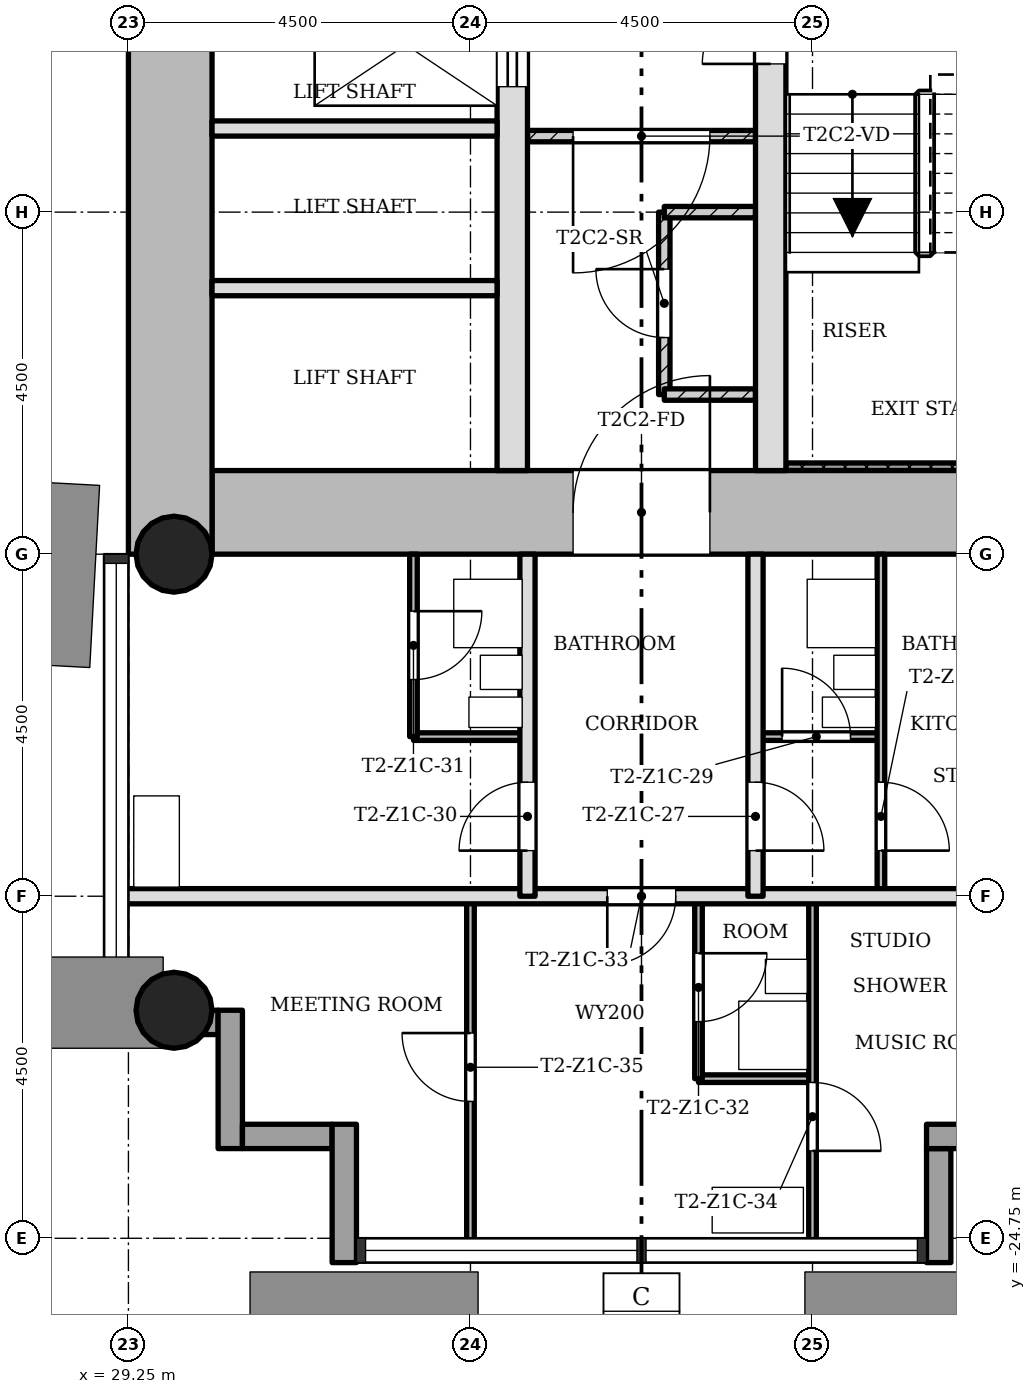
"""IFC4 building model, lengths in metres.
Left out: names, types, materials, properties, quantities, classifications, styles, units other than length and angle.
Written with IfcOpenShell. Run it as: python <this file> out.ifc"""

import sys

from ifc_helpers import new_model, si_unit, direction, frame, frame_2d, origin, origin_2d, place, context, subcontext, project, spatial, rectangle, hollow_circle, extrude, element, fill, save


model = new_model("IFC4")
c1 = context("Model", 3, precision=1e-05, world=origin(), true_north=direction((0.0, 1.0)))
c2 = subcontext(c1, "Body", "Model", "MODEL_VIEW")
j1 = project(units=[si_unit("LENGTHUNIT", "METRE"), si_unit("PLANEANGLEUNIT", "RADIAN")], contexts=[c1])
p1 = place(None, origin())
s1 = spatial("IfcSite", under=j1, at=p1, CompositionType="ELEMENT")
p2 = place(p1, origin())
s2 = spatial("IfcBuilding", under=s1, at=p2, CompositionType="ELEMENT")
p3 = place(p2, frame((0.0, 0.0, 44.9)))
s3 = spatial("IfcBuildingStorey", under=s2, at=p3, CompositionType="ELEMENT", Elevation=44.9)
p4 = place(p3, frame((30.35, -15.2, 0.0), z_axis=(0.0, 0.0, 1.0), x_axis=(1.0, 0.0, 0.0)))
e1 = element("IfcWall", 1, at=p4, inside=s3, PredefinedType="SHEAR", context=c2, shape_type="SweptSolid", body=[
    extrude(rectangle(XDim=12.4, YDim=1.1, at=frame_2d((6.2, 0.0))), origin(), (0.0, 0.0, 1.0), 3.4),
])
p5 = place(p4, frame((4.75, 0.0, 0.0)))
e2 = element("IfcOpeningElement", 2, at=p5, cuts=e1, PredefinedType="OPENING", context=c2, shape_type="SweptSolid", body=[
    extrude(rectangle(XDim=1.8, YDim=2.1, at=frame_2d((0.9, 1.05))), frame((0.0, 0.56, 0.0), z_axis=(0.0, -1.0, 0.0), x_axis=(1.0, 0.0, 0.0)), (0.0, 0.0, 1.0), 1.12),
])
p6 = place(p3, frame((29.8, -7.85, 0.0), z_axis=(0.0, 0.0, 1.0), x_axis=(0.0, -1.0, 0.0)))
e3 = element("IfcWall", 3, at=p6, inside=s3, PredefinedType="SHEAR", context=c2, shape_type="SweptSolid", body=[
    extrude(rectangle(XDim=7.9, YDim=1.1, at=frame_2d((3.95, 0.0))), origin(), (0.0, 0.0, 1.0), 3.4),
])
p7 = place(p3, frame((34.3, -14.65, 0.0), z_axis=(0.0, 0.0, 1.0), x_axis=(0.0, 1.0, 0.0)))
e4 = element("IfcWall", 4, at=p7, inside=s3, PredefinedType="SHEAR", context=c2, shape_type="SweptSolid", body=[
    extrude(rectangle(XDim=6.8, YDim=0.4, at=frame_2d((3.4, 0.0))), origin(), (0.0, 0.0, 1.0), 3.4),
])
p8 = place(p7, frame((5.05, 0.0, 0.0)))
e5 = element("IfcOpeningElement", 5, at=p8, cuts=e4, PredefinedType="OPENING", context=c2, shape_type="SweptSolid", body=[
    extrude(rectangle(XDim=1.1, YDim=2.1, at=frame_2d((0.55, 1.05))), frame((0.0, 0.21, 0.0), z_axis=(0.0, -1.0, 0.0), x_axis=(1.0, 0.0, 0.0)), (0.0, 0.0, 1.0), 0.42),
])
p9 = place(p3, frame((37.7, -14.65, 0.0), z_axis=(0.0, 0.0, 1.0), x_axis=(0.0, 1.0, 0.0)))
e6 = element("IfcWall", 6, at=p9, inside=s3, PredefinedType="SHEAR", context=c2, shape_type="SweptSolid", body=[
    extrude(rectangle(XDim=6.8, YDim=0.4, at=frame_2d((3.4, 0.0))), origin(), (0.0, 0.0, 1.0), 3.4),
])
p10 = place(p9, frame((5.35, 0.0, 0.0)))
e7 = element("IfcOpeningElement", 7, at=p10, cuts=e6, PredefinedType="OPENING", context=c2, shape_type="SweptSolid", body=[
    extrude(rectangle(XDim=0.9, YDim=2.1, at=frame_2d((0.45, 1.05))), frame((0.0, 0.21, 0.0), z_axis=(0.0, -1.0, 0.0), x_axis=(1.0, 0.0, 0.0)), (0.0, 0.0, 1.0), 0.42),
])
for number, where, z_axis, x_axis in (
    (8, (29.85, -15.75, 0.0), (0.0, 0.0, 1.0), (1.0, 0.0, 0.0)),
    (9, (29.85, -21.75, 0.0), (0.0, 0.0, 1.0), (1.0, 0.0, 0.0)),
):
    element("IfcColumn", number, at=place(p3, frame(where, z_axis=z_axis, x_axis=x_axis)), inside=s3, PredefinedType="COLUMN", context=c2, shape_type="SweptSolid", body=[
        extrude(hollow_circle(Radius=0.5, WallThickness=0.036, at=origin_2d()), origin(), (0.0, 0.0, 1.0), 3.4),
    ])
p11 = place(p3, frame((39.91, -25.07, -0.3), z_axis=(0.0, 0.0, 1.0), x_axis=(0.0, 1.0, 0.0)))
e10 = element("IfcWall", 10, at=p11, inside=s3, PredefinedType="STANDARD", context=c2, shape_type="SweptSolid", body=[
    extrude(rectangle(XDim=1.5, YDim=0.32, at=frame_2d((0.75, 0.0))), origin(), (0.0, 0.0, 1.0), 3.4),
])
p12 = place(p3, frame((39.75, -23.41, -0.3), z_axis=(0.0, 0.0, 1.0), x_axis=(1.0, 0.0, 0.0)))
e11 = element("IfcWall", 11, at=p12, inside=s3, PredefinedType="STANDARD", context=c2, shape_type="SweptSolid", body=[
    extrude(rectangle(XDim=1.82, YDim=0.32, at=frame_2d((0.91, 0.0))), origin(), (0.0, 0.0, 1.0), 3.4),
])
p13 = place(p3, frame((28.93, -21.91, -0.3), z_axis=(0.0, 0.0, 1.0), x_axis=(1.0, 0.0, 0.0)))
e12 = element("IfcWall", 12, at=p13, inside=s3, PredefinedType="STANDARD", context=c2, shape_type="SweptSolid", body=[
    extrude(rectangle(XDim=1.5, YDim=0.32, at=frame_2d((0.75, 0.0))), origin(), (0.0, 0.0, 1.0), 3.4),
])
p14 = place(p3, frame((30.59, -21.75, -0.3), z_axis=(0.0, 0.0, 1.0), x_axis=(0.0, -1.0, 0.0)))
e13 = element("IfcWall", 13, at=p14, inside=s3, PredefinedType="STANDARD", context=c2, shape_type="SweptSolid", body=[
    extrude(rectangle(XDim=1.82, YDim=0.32, at=frame_2d((0.91, 0.0))), origin(), (0.0, 0.0, 1.0), 3.4),
])
p15 = place(p3, frame((30.75, -23.41, -0.3), z_axis=(0.0, 0.0, 1.0), x_axis=(1.0, 0.0, 0.0)))
e14 = element("IfcWall", 14, at=p15, inside=s3, PredefinedType="STANDARD", context=c2, shape_type="SweptSolid", body=[
    extrude(rectangle(XDim=1.18, YDim=0.32, at=frame_2d((0.59, 0.0))), origin(), (0.0, 0.0, 1.0), 3.4),
])
p16 = place(p3, frame((32.09, -23.25, -0.3), z_axis=(0.0, 0.0, 1.0), x_axis=(0.0, -1.0, 0.0)))
e15 = element("IfcWall", 15, at=p16, inside=s3, PredefinedType="STANDARD", context=c2, shape_type="SweptSolid", body=[
    extrude(rectangle(XDim=1.82, YDim=0.32, at=frame_2d((0.91, 0.0))), origin(), (0.0, 0.0, 1.0), 3.4),
])
p17 = place(p3, frame((34.5, -10.25, 0.0), z_axis=(0.0, 0.0, 1.0), x_axis=(1.0, 0.0, 0.0)))
e16 = element("IfcWall", 16, at=p17, inside=s3, PredefinedType="PARTITIONING", context=c2, shape_type="SweptSolid", body=[
    extrude(rectangle(XDim=3.0, YDim=0.15, at=frame_2d((1.5, 0.0))), origin(), (0.0, 0.0, 1.0), 3.0),
])
p18 = place(p17, frame((0.6, 0.0, 0.0)))
e17 = element("IfcOpeningElement", 17, at=p18, cuts=e16, PredefinedType="OPENING", context=c2, shape_type="SweptSolid", body=[
    extrude(rectangle(XDim=1.8, YDim=2.1, at=frame_2d((0.9, 1.05))), frame((0.0, 0.085, 0.0), z_axis=(0.0, -1.0, 0.0), x_axis=(1.0, 0.0, 0.0)), (0.0, 0.0, 1.0), 0.17),
])
for number, where, z_axis, x_axis in (
    (18, (30.35, -10.15, 0.0), (0.0, 0.0, 1.0), (1.0, 0.0, 0.0)),
    (19, (30.35, -12.25, 0.0), (0.0, 0.0, 1.0), (1.0, 0.0, 0.0)),
):
    element("IfcWall", number, at=place(p3, frame(where, z_axis=z_axis, x_axis=x_axis)), inside=s3, PredefinedType="SOLIDWALL", context=c2, shape_type="SweptSolid", body=[
        extrude(rectangle(XDim=3.75, YDim=0.2, at=frame_2d((1.875, 0.0))), origin(), (0.0, 0.0, 1.0), 3.0),
    ])
p19 = place(p3, frame((36.3, -11.25, 0.0), z_axis=(0.0, 0.0, 1.0), x_axis=(0.0, -1.0, 0.0)))
e20 = element("IfcWall", 20, at=p19, inside=s3, PredefinedType="PARTITIONING", context=c2, shape_type="SweptSolid", body=[
    extrude(rectangle(XDim=2.4, YDim=0.15, at=frame_2d((1.2, 0.0))), origin(), (0.0, 0.0, 1.0), 3.0),
])
p20 = place(p19, frame((0.75, 0.0, 0.0)))
e21 = element("IfcOpeningElement", 21, at=p20, cuts=e20, PredefinedType="OPENING", context=c2, shape_type="SweptSolid", body=[
    extrude(rectangle(XDim=0.9, YDim=2.1, at=frame_2d((0.45, 1.05))), frame((0.0, 0.085, 0.0), z_axis=(0.0, -1.0, 0.0), x_axis=(1.0, 0.0, 0.0)), (0.0, 0.0, 1.0), 0.17),
])
for number, where, z_axis, x_axis in (
    (22, (36.3, -11.25, 0.0), (0.0, 0.0, 1.0), (1.0, 0.0, 0.0)),
    (23, (36.3, -13.65, 0.0), (0.0, 0.0, 1.0), (1.0, 0.0, 0.0)),
):
    element("IfcWall", number, at=place(p3, frame(where, z_axis=z_axis, x_axis=x_axis)), inside=s3, PredefinedType="PARTITIONING", context=c2, shape_type="SweptSolid", body=[
        extrude(rectangle(XDim=1.2, YDim=0.15, at=frame_2d((0.6, 0.0))), origin(), (0.0, 0.0, 1.0), 3.0),
    ])
p21 = place(p3, frame((38.25, -22.65, 0.0), z_axis=(0.0, 0.0, 1.0), x_axis=(-1.0, 0.0, 0.0)))
e24 = element("IfcWall", 24, at=p21, inside=s3, PredefinedType="PARTITIONING", context=c2, shape_type="SweptSolid", body=[
    extrude(rectangle(XDim=1.5, YDim=0.1, at=frame_2d((0.75, 0.0))), origin(), (0.0, 0.0, 1.0), 3.0),
])
p22 = place(p3, frame((42.85, -20.25, 0.0), z_axis=(0.0, 0.0, 1.0), x_axis=(-1.0, 0.0, 0.0)))
e25 = element("IfcWall", 25, at=p22, inside=s3, PredefinedType="SOLIDWALL", context=c2, shape_type="SweptSolid", body=[
    extrude(rectangle(XDim=13.7, YDim=0.2, at=frame_2d((6.85, 0.0))), origin(), (0.0, 0.0, 1.0), 3.0),
])
p23 = place(p22, frame((6.4, 0.0, 0.0)))
e26 = element("IfcOpeningElement", 26, at=p23, cuts=e25, PredefinedType="OPENING", context=c2, shape_type="SweptSolid", body=[
    extrude(rectangle(XDim=0.9, YDim=2.1, at=frame_2d((0.45, 1.05))), frame((0.0, 0.11, 0.0), z_axis=(0.0, -1.0, 0.0), x_axis=(1.0, 0.0, 0.0)), (0.0, 0.0, 1.0), 0.22),
])
p24 = place(p3, frame((39.15, -18.15, 0.0), z_axis=(0.0, 0.0, 1.0), x_axis=(-1.0, 0.0, 0.0)))
e27 = element("IfcWall", 27, at=p24, inside=s3, PredefinedType="PARTITIONING", context=c2, shape_type="SweptSolid", body=[
    extrude(rectangle(XDim=1.65, YDim=0.1, at=frame_2d((0.825, 0.0))), origin(), (0.0, 0.0, 1.0), 3.0),
])
p25 = place(p24, frame((0.4, 0.0, 0.0)))
e28 = element("IfcOpeningElement", 28, at=p25, cuts=e27, PredefinedType="OPENING", context=c2, shape_type="SweptSolid", body=[
    extrude(rectangle(XDim=0.9, YDim=2.1, at=frame_2d((0.45, 1.05))), frame((0.0, 0.06, 0.0), z_axis=(0.0, -1.0, 0.0), x_axis=(1.0, 0.0, 0.0)), (0.0, 0.0, 1.0), 0.12),
])
p26 = place(p3, frame((34.5, -18.15, 0.0), z_axis=(0.0, 0.0, 1.0), x_axis=(-1.0, 0.0, 0.0)))
e29 = element("IfcWall", 29, at=p26, inside=s3, PredefinedType="PARTITIONING", context=c2, shape_type="SweptSolid", body=[
    extrude(rectangle(XDim=1.5, YDim=0.1, at=frame_2d((0.75, 0.0))), origin(), (0.0, 0.0, 1.0), 3.0),
])
p27 = place(p3, frame((39.15, -20.25, 0.0), z_axis=(0.0, 0.0, 1.0), x_axis=(0.0, 1.0, 0.0)))
e30 = element("IfcWall", 30, at=p27, inside=s3, PredefinedType="PARTITIONING", context=c2, shape_type="SweptSolid", body=[
    extrude(rectangle(XDim=4.5, YDim=0.1, at=frame_2d((2.25, 0.0))), origin(), (0.0, 0.0, 1.0), 3.0),
])
p28 = place(p27, frame((0.6, 0.0, 0.0)))
e31 = element("IfcOpeningElement", 31, at=p28, cuts=e30, PredefinedType="OPENING", context=c2, shape_type="SweptSolid", body=[
    extrude(rectangle(XDim=0.9, YDim=2.1, at=frame_2d((0.45, 1.05))), frame((0.0, 0.06, 0.0), z_axis=(0.0, -1.0, 0.0), x_axis=(1.0, 0.0, 0.0)), (0.0, 0.0, 1.0), 0.12),
])
p29 = place(p3, frame((38.25, -24.85, 0.0), z_axis=(0.0, 0.0, 1.0), x_axis=(0.0, 1.0, 0.0)))
e32 = element("IfcWall", 32, at=p29, inside=s3, PredefinedType="PARTITIONING", context=c2, shape_type="SweptSolid", body=[
    extrude(rectangle(XDim=4.6, YDim=0.1, at=frame_2d((2.3, 0.0))), origin(), (0.0, 0.0, 1.0), 3.0),
])
p30 = place(p29, frame((1.25, 0.0, 0.0)))
e33 = element("IfcOpeningElement", 33, at=p30, cuts=e32, PredefinedType="OPENING", context=c2, shape_type="SweptSolid", body=[
    extrude(rectangle(XDim=0.9, YDim=2.1, at=frame_2d((0.45, 1.05))), frame((0.0, 0.06, 0.0), z_axis=(0.0, -1.0, 0.0), x_axis=(1.0, 0.0, 0.0)), (0.0, 0.0, 1.0), 0.12),
])
p31 = place(p3, frame((37.5, -20.25, 0.0), z_axis=(0.0, 0.0, 1.0), x_axis=(0.0, 1.0, 0.0)))
e34 = element("IfcWall", 34, at=p31, inside=s3, PredefinedType="SOLIDWALL", context=c2, shape_type="SweptSolid", body=[
    extrude(rectangle(XDim=4.5, YDim=0.2, at=frame_2d((2.25, 0.0))), origin(), (0.0, 0.0, 1.0), 3.0),
])
p32 = place(p31, frame((0.6, 0.0, 0.0)))
e35 = element("IfcOpeningElement", 35, at=p32, cuts=e34, PredefinedType="OPENING", context=c2, shape_type="SweptSolid", body=[
    extrude(rectangle(XDim=0.9, YDim=2.1, at=frame_2d((0.45, 1.05))), frame((0.0, 0.11, 0.0), z_axis=(0.0, -1.0, 0.0), x_axis=(1.0, 0.0, 0.0)), (0.0, 0.0, 1.0), 0.22),
])
p33 = place(p3, frame((36.75, -22.65, 0.0), z_axis=(0.0, 0.0, 1.0), x_axis=(0.0, 1.0, 0.0)))
e36 = element("IfcWall", 36, at=p33, inside=s3, PredefinedType="PARTITIONING", context=c2, shape_type="SweptSolid", body=[
    extrude(rectangle(XDim=2.4, YDim=0.1, at=frame_2d((1.2, 0.0))), origin(), (0.0, 0.0, 1.0), 3.0),
])
p34 = place(p33, frame((0.75, 0.0, 0.0)))
e37 = element("IfcOpeningElement", 37, at=p34, cuts=e36, PredefinedType="OPENING", context=c2, shape_type="SweptSolid", body=[
    extrude(rectangle(XDim=0.9, YDim=2.1, at=frame_2d((0.45, 1.05))), frame((0.0, 0.06, 0.0), z_axis=(0.0, -1.0, 0.0), x_axis=(1.0, 0.0, 0.0)), (0.0, 0.0, 1.0), 0.12),
])
p35 = place(p3, frame((34.5, -20.25, 0.0), z_axis=(0.0, 0.0, 1.0), x_axis=(0.0, 1.0, 0.0)))
e38 = element("IfcWall", 38, at=p35, inside=s3, PredefinedType="SOLIDWALL", context=c2, shape_type="SweptSolid", body=[
    extrude(rectangle(XDim=4.5, YDim=0.2, at=frame_2d((2.25, 0.0))), origin(), (0.0, 0.0, 1.0), 3.0),
])
p36 = place(p35, frame((0.6, 0.0, 0.0)))
e39 = element("IfcOpeningElement", 39, at=p36, cuts=e38, PredefinedType="OPENING", context=c2, shape_type="SweptSolid", body=[
    extrude(rectangle(XDim=0.9, YDim=2.1, at=frame_2d((0.45, 1.05))), frame((0.0, 0.11, 0.0), z_axis=(0.0, -1.0, 0.0), x_axis=(1.0, 0.0, 0.0)), (0.0, 0.0, 1.0), 0.22),
])
p37 = place(p3, frame((33.75, -24.85, 0.0), z_axis=(0.0, 0.0, 1.0), x_axis=(0.0, 1.0, 0.0)))
e40 = element("IfcWall", 40, at=p37, inside=s3, PredefinedType="PARTITIONING", context=c2, shape_type="SweptSolid", body=[
    extrude(rectangle(XDim=4.6, YDim=0.1, at=frame_2d((2.3, 0.0))), origin(), (0.0, 0.0, 1.0), 3.0),
])
p38 = place(p37, frame((1.9, 0.0, 0.0)))
e41 = element("IfcOpeningElement", 41, at=p38, cuts=e40, PredefinedType="OPENING", context=c2, shape_type="SweptSolid", body=[
    extrude(rectangle(XDim=0.9, YDim=2.1, at=frame_2d((0.45, 1.05))), frame((0.0, 0.06, 0.0), z_axis=(0.0, -1.0, 0.0), x_axis=(1.0, 0.0, 0.0)), (0.0, 0.0, 1.0), 0.12),
])
p39 = place(p3, frame((33.0, -18.15, 0.0), z_axis=(0.0, 0.0, 1.0), x_axis=(0.0, 1.0, 0.0)))
e42 = element("IfcWall", 42, at=p39, inside=s3, PredefinedType="PARTITIONING", context=c2, shape_type="SweptSolid", body=[
    extrude(rectangle(XDim=2.4, YDim=0.1, at=frame_2d((1.2, 0.0))), origin(), (0.0, 0.0, 1.0), 3.0),
])
p40 = place(p39, frame((0.75, 0.0, 0.0)))
e43 = element("IfcOpeningElement", 43, at=p40, cuts=e42, PredefinedType="OPENING", context=c2, shape_type="SweptSolid", body=[
    extrude(rectangle(XDim=0.9, YDim=2.1, at=frame_2d((0.45, 1.05))), frame((0.0, 0.06, 0.0), z_axis=(0.0, -1.0, 0.0), x_axis=(1.0, 0.0, 0.0)), (0.0, 0.0, 1.0), 0.12),
])
p41 = place(p3, frame((37.9, -14.6, 0.0), z_axis=(0.0, 0.0, 1.0), x_axis=(1.0, 0.0, 0.0)))
e44 = element("IfcWall", 44, at=p41, inside=s3, PredefinedType="SHEAR", context=c2, shape_type="SweptSolid", body=[
    extrude(rectangle(XDim=3.75, YDim=0.1, at=frame_2d((1.875, 0.0))), origin(), (0.0, 0.0, 1.0), 3.4),
])
p42 = place(p18, origin())
e45 = element("IfcDoor", 45, at=p42, inside=s3, OperationType="SINGLE_SWING_LEFT", PredefinedType="DOOR", context=c2, shape_type="SweptSolid", body=[
    extrude(rectangle(XDim=1.8, YDim=2.1, at=frame_2d((0.9, 1.05))), frame((0.0, 0.025, 0.0), z_axis=(0.0, -1.0, 0.0), x_axis=(1.0, 0.0, 0.0)), (0.0, 0.0, 1.0), 0.05),
])
fill(e17, e45)
p43 = place(p20, origin())
e46 = element("IfcDoor", 46, at=p43, inside=s3, OperationType="SINGLE_SWING_LEFT", PredefinedType="DOOR", context=c2, shape_type="SweptSolid", body=[
    extrude(rectangle(XDim=0.9, YDim=2.1, at=frame_2d((0.45, 1.05))), frame((0.0, 0.025, 0.0), z_axis=(0.0, -1.0, 0.0), x_axis=(1.0, 0.0, 0.0)), (0.0, 0.0, 1.0), 0.05),
])
fill(e21, e46)
p44 = place(p32, origin())
e47 = element("IfcDoor", 47, at=p44, inside=s3, OperationType="SINGLE_SWING_LEFT", PredefinedType="DOOR", context=c2, shape_type="SweptSolid", body=[
    extrude(rectangle(XDim=0.9, YDim=2.1, at=frame_2d((0.45, 1.05))), frame((0.0, 0.025, 0.0), z_axis=(0.0, -1.0, 0.0), x_axis=(1.0, 0.0, 0.0)), (0.0, 0.0, 1.0), 0.05),
])
fill(e35, e47)
p45 = place(p28, origin())
e48 = element("IfcDoor", 48, at=p45, inside=s3, OperationType="SINGLE_SWING_LEFT", PredefinedType="DOOR", context=c2, shape_type="SweptSolid", body=[
    extrude(rectangle(XDim=0.9, YDim=2.1, at=frame_2d((0.45, 1.05))), frame((0.0, 0.025, 0.0), z_axis=(0.0, -1.0, 0.0), x_axis=(1.0, 0.0, 0.0)), (0.0, 0.0, 1.0), 0.05),
])
fill(e31, e48)
p46 = place(p25, origin())
e49 = element("IfcDoor", 49, at=p46, inside=s3, OperationType="SINGLE_SWING_RIGHT", PredefinedType="DOOR", context=c2, shape_type="SweptSolid", body=[
    extrude(rectangle(XDim=0.9, YDim=2.1, at=frame_2d((0.45, 1.05))), frame((0.0, 0.025, 0.0), z_axis=(0.0, -1.0, 0.0), x_axis=(1.0, 0.0, 0.0)), (0.0, 0.0, 1.0), 0.05),
])
fill(e28, e49)
p47 = place(p36, origin())
e50 = element("IfcDoor", 50, at=p47, inside=s3, OperationType="SINGLE_SWING_RIGHT", PredefinedType="DOOR", context=c2, shape_type="SweptSolid", body=[
    extrude(rectangle(XDim=0.9, YDim=2.1, at=frame_2d((0.45, 1.05))), frame((0.0, 0.025, 0.0), z_axis=(0.0, -1.0, 0.0), x_axis=(1.0, 0.0, 0.0)), (0.0, 0.0, 1.0), 0.05),
])
fill(e39, e50)
p48 = place(p40, origin())
e51 = element("IfcDoor", 51, at=p48, inside=s3, OperationType="SINGLE_SWING_RIGHT", PredefinedType="DOOR", context=c2, shape_type="SweptSolid", body=[
    extrude(rectangle(XDim=0.9, YDim=2.1, at=frame_2d((0.45, 1.05))), frame((0.0, 0.025, 0.0), z_axis=(0.0, -1.0, 0.0), x_axis=(1.0, 0.0, 0.0)), (0.0, 0.0, 1.0), 0.05),
])
fill(e43, e51)
p49 = place(p34, origin())
e52 = element("IfcDoor", 52, at=p49, inside=s3, OperationType="SINGLE_SWING_RIGHT", PredefinedType="DOOR", context=c2, shape_type="SweptSolid", body=[
    extrude(rectangle(XDim=0.9, YDim=2.1, at=frame_2d((0.45, 1.05))), frame((0.0, 0.025, 0.0), z_axis=(0.0, -1.0, 0.0), x_axis=(1.0, 0.0, 0.0)), (0.0, 0.0, 1.0), 0.05),
])
fill(e37, e52)
p50 = place(p23, origin())
e53 = element("IfcDoor", 53, at=p50, inside=s3, OperationType="SINGLE_SWING_LEFT", PredefinedType="DOOR", context=c2, shape_type="SweptSolid", body=[
    extrude(rectangle(XDim=0.9, YDim=2.1, at=frame_2d((0.45, 1.05))), frame((0.0, 0.025, 0.0), z_axis=(0.0, -1.0, 0.0), x_axis=(1.0, 0.0, 0.0)), (0.0, 0.0, 1.0), 0.05),
])
fill(e26, e53)
p51 = place(p30, origin())
e54 = element("IfcDoor", 54, at=p51, inside=s3, OperationType="SINGLE_SWING_LEFT", PredefinedType="DOOR", context=c2, shape_type="SweptSolid", body=[
    extrude(rectangle(XDim=0.9, YDim=2.1, at=frame_2d((0.45, 1.05))), frame((0.0, 0.025, 0.0), z_axis=(0.0, -1.0, 0.0), x_axis=(1.0, 0.0, 0.0)), (0.0, 0.0, 1.0), 0.05),
])
fill(e33, e54)
p52 = place(p38, origin())
e55 = element("IfcDoor", 55, at=p52, inside=s3, OperationType="SINGLE_SWING_LEFT", PredefinedType="DOOR", context=c2, shape_type="SweptSolid", body=[
    extrude(rectangle(XDim=0.9, YDim=2.1, at=frame_2d((0.45, 1.05))), frame((0.0, 0.025, 0.0), z_axis=(0.0, -1.0, 0.0), x_axis=(1.0, 0.0, 0.0)), (0.0, 0.0, 1.0), 0.05),
])
fill(e41, e55)
p53 = place(p10, origin())
e56 = element("IfcDoor", 56, at=p53, inside=s3, OperationType="SINGLE_SWING_RIGHT", PredefinedType="DOOR", context=c2, shape_type="SweptSolid", body=[
    extrude(rectangle(XDim=0.9, YDim=2.1, at=frame_2d((0.45, 1.05))), frame((0.0, 0.025, 0.0), z_axis=(0.0, -1.0, 0.0), x_axis=(1.0, 0.0, 0.0)), (0.0, 0.0, 1.0), 0.05),
])
fill(e7, e56)
p54 = place(p8, origin())
e57 = element("IfcDoor", 57, at=p54, inside=s3, OperationType="SLIDING_TO_LEFT", PredefinedType="DOOR", context=c2, shape_type="SweptSolid", body=[
    extrude(rectangle(XDim=1.1, YDim=2.1, at=frame_2d((0.55, 1.05))), frame((0.0, 0.025, 0.0), z_axis=(0.0, -1.0, 0.0), x_axis=(1.0, 0.0, 0.0)), (0.0, 0.0, 1.0), 0.05),
])
fill(e5, e57)
p55 = place(p5, origin())
e58 = element("IfcDoor", 58, at=p55, inside=s3, OperationType="SINGLE_SWING_LEFT", PredefinedType="DOOR", context=c2, shape_type="SweptSolid", body=[
    extrude(rectangle(XDim=1.8, YDim=2.1, at=frame_2d((0.9, 1.05))), frame((0.0, 0.025, 0.0), z_axis=(0.0, -1.0, 0.0), x_axis=(1.0, 0.0, 0.0)), (0.0, 0.0, 1.0), 0.05),
])
fill(e2, e58)
save(model, sys.argv[1])
